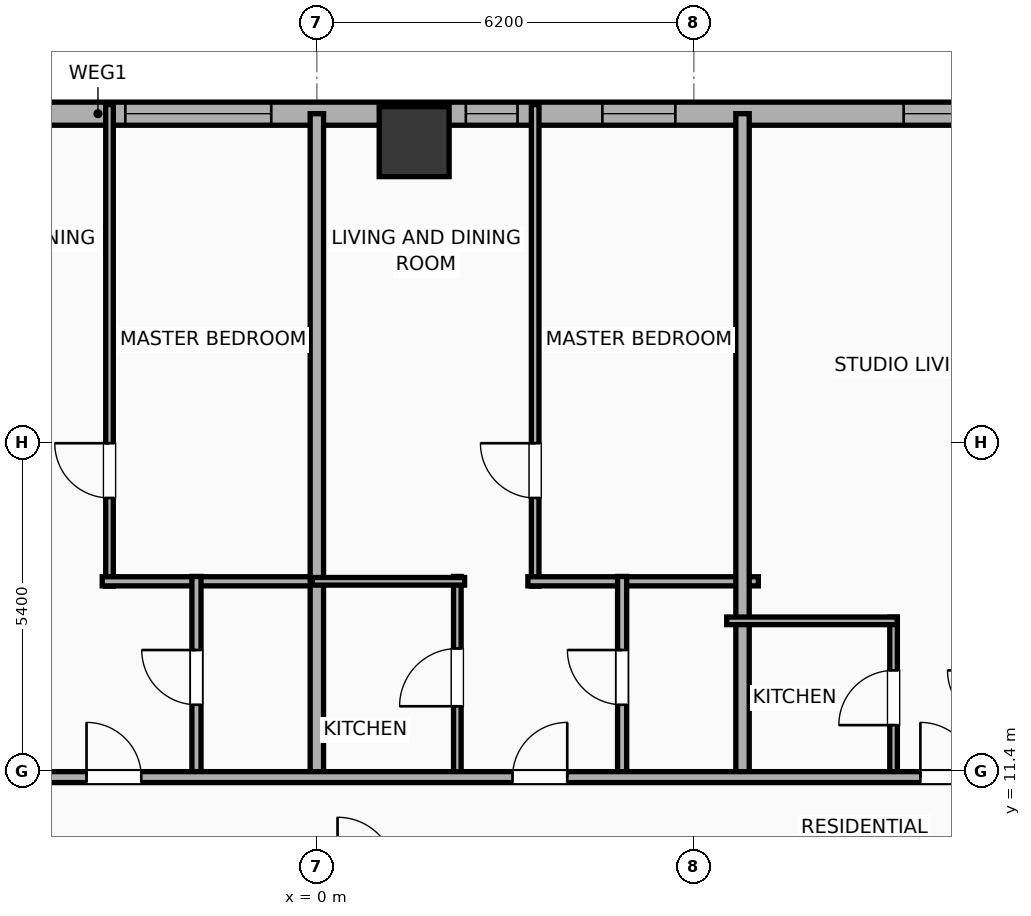
"""IFC4 building model, lengths in metres.
Left out: names, types, materials, properties, quantities, classifications, styles, units other than length and angle.
Written with IfcOpenShell. Run it as: python <this file> out.ifc"""

import sys

from ifc_helpers import new_model, si_unit, direction, frame, frame_2d, origin, origin_2d, place, context, subcontext, project, spatial, rectangle, hollow_rectangle, extrude, element, fill, save


model = new_model("IFC4")
c1 = context("Model", 3, precision=1e-05, world=origin(), true_north=direction((0.0, 1.0)))
c2 = subcontext(c1, "Body", "Model", "MODEL_VIEW")
j1 = project(units=[si_unit("LENGTHUNIT", "METRE"), si_unit("PLANEANGLEUNIT", "RADIAN")], contexts=[c1])
p1 = place(None, origin())
s1 = spatial("IfcSite", under=j1, at=p1, CompositionType="ELEMENT")
p2 = place(p1, origin())
s2 = spatial("IfcBuilding", under=s1, at=p2, CompositionType="ELEMENT")
p3 = place(p2, frame((0.0, 0.0, 49.4)))
s3 = spatial("IfcBuildingStorey", under=s2, at=p3, CompositionType="ELEMENT", Elevation=49.4)
p4 = place(p3, frame((1.6, 21.75, 0.0), z_axis=(0.0, 0.0, 1.0), x_axis=(1.0, 0.0, 0.0)))
e1 = element("IfcColumn", 1, at=p4, inside=s3, PredefinedType="COLUMN", context=c2, shape_type="SweptSolid", body=[
    extrude(hollow_rectangle(XDim=1.15, YDim=1.15, WallThickness=0.04, at=origin_2d()), origin(), (0.0, 0.0, 1.0), 3.9),
])
p5 = place(p3, frame((-29.581, 22.21, 0.0), z_axis=(0.0, 0.0, 1.0), x_axis=(1.0, 0.0, 0.0)))
e2 = element("IfcWall", 2, at=p5, inside=s3, PredefinedType="ELEMENTEDWALL", context=c2, shape_type="SweptSolid", body=[
    extrude(rectangle(XDim=51.963, YDim=0.38, at=frame_2d((25.981, 0.0))), origin(), (0.0, 0.0, 1.0), 3.65),
])
p6 = place(p5, frame((6.61, 0.0, 0.75)))
e3 = element("IfcOpeningElement", 3, at=p6, cuts=e2, PredefinedType="OPENING", context=c2, shape_type="SweptSolid", body=[
    extrude(rectangle(XDim=2.4, YDim=2.1, at=frame_2d((1.2, 1.05))), frame((0.0, 0.2, 0.0), z_axis=(0.0, -1.0, 0.0), x_axis=(1.0, 0.0, 0.0)), (0.0, 0.0, 1.0), 0.4),
])
p7 = place(p5, frame((26.431, 0.0, 0.75)))
e4 = element("IfcOpeningElement", 4, at=p7, cuts=e2, PredefinedType="OPENING", context=c2, shape_type="SweptSolid", body=[
    extrude(rectangle(XDim=2.4, YDim=2.1, at=frame_2d((1.2, 1.05))), frame((0.0, 0.2, 0.0), z_axis=(0.0, -1.0, 0.0), x_axis=(1.0, 0.0, 0.0)), (0.0, 0.0, 1.0), 0.4),
])
p8 = place(p5, frame((43.752, 0.0, 0.75)))
e5 = element("IfcOpeningElement", 5, at=p8, cuts=e2, PredefinedType="OPENING", context=c2, shape_type="SweptSolid", body=[
    extrude(rectangle(XDim=2.4, YDim=2.1, at=frame_2d((1.2, 1.05))), frame((0.0, 0.2, 0.0), z_axis=(0.0, -1.0, 0.0), x_axis=(1.0, 0.0, 0.0)), (0.0, 0.0, 1.0), 0.4),
])
p9 = place(p5, frame((1.281, 0.0, 0.75)))
e6 = element("IfcOpeningElement", 6, at=p9, cuts=e2, PredefinedType="OPENING", context=c2, shape_type="SweptSolid", body=[
    extrude(rectangle(XDim=1.2, YDim=2.05, at=frame_2d((0.6, 1.025))), frame((0.0, 0.2, 0.0), z_axis=(0.0, -1.0, 0.0), x_axis=(1.0, 0.0, 0.0)), (0.0, 0.0, 1.0), 0.4),
])
p10 = place(p5, frame((3.922, 0.0, 0.75)))
e7 = element("IfcOpeningElement", 7, at=p10, cuts=e2, PredefinedType="OPENING", context=c2, shape_type="SweptSolid", body=[
    extrude(rectangle(XDim=1.2, YDim=2.05, at=frame_2d((0.6, 1.025))), frame((0.0, 0.2, 0.0), z_axis=(0.0, -1.0, 0.0), x_axis=(1.0, 0.0, 0.0)), (0.0, 0.0, 1.0), 0.4),
])
p11 = place(p5, frame((12.231, 0.0, 0.75)))
e8 = element("IfcOpeningElement", 8, at=p11, cuts=e2, PredefinedType="OPENING", context=c2, shape_type="SweptSolid", body=[
    extrude(rectangle(XDim=1.2, YDim=2.05, at=frame_2d((0.6, 1.025))), frame((0.0, 0.2, 0.0), z_axis=(0.0, -1.0, 0.0), x_axis=(1.0, 0.0, 0.0)), (0.0, 0.0, 1.0), 0.4),
])
p12 = place(p5, frame((18.805, 0.0, 0.75)))
e9 = element("IfcOpeningElement", 9, at=p12, cuts=e2, PredefinedType="OPENING", context=c2, shape_type="SweptSolid", body=[
    extrude(rectangle(XDim=1.2, YDim=2.05, at=frame_2d((0.6, 1.025))), frame((0.0, 0.2, 0.0), z_axis=(0.0, -1.0, 0.0), x_axis=(1.0, 0.0, 0.0)), (0.0, 0.0, 1.0), 0.4),
])
p13 = place(p5, frame((16.755, 0.0, 0.75)))
e10 = element("IfcOpeningElement", 10, at=p13, cuts=e2, PredefinedType="OPENING", context=c2, shape_type="SweptSolid", body=[
    extrude(rectangle(XDim=1.2, YDim=2.05, at=frame_2d((0.6, 1.025))), frame((0.0, 0.2, 0.0), z_axis=(0.0, -1.0, 0.0), x_axis=(1.0, 0.0, 0.0)), (0.0, 0.0, 1.0), 0.4),
])
p14 = place(p5, frame((23.776, 0.0, 0.75)))
e11 = element("IfcOpeningElement", 11, at=p14, cuts=e2, PredefinedType="OPENING", context=c2, shape_type="SweptSolid", body=[
    extrude(rectangle(XDim=1.2, YDim=2.05, at=frame_2d((0.6, 1.025))), frame((0.0, 0.2, 0.0), z_axis=(0.0, -1.0, 0.0), x_axis=(1.0, 0.0, 0.0)), (0.0, 0.0, 1.0), 0.4),
])
p15 = place(p5, frame((32.031, 0.0, 0.75)))
e12 = element("IfcOpeningElement", 12, at=p15, cuts=e2, PredefinedType="OPENING", context=c2, shape_type="SweptSolid", body=[
    extrude(rectangle(XDim=0.85, YDim=2.05, at=frame_2d((0.425, 1.025))), frame((0.0, 0.2, 0.0), z_axis=(0.0, -1.0, 0.0), x_axis=(1.0, 0.0, 0.0)), (0.0, 0.0, 1.0), 0.4),
])
p16 = place(p5, frame((34.276, 0.0, 0.75)))
e13 = element("IfcOpeningElement", 13, at=p16, cuts=e2, PredefinedType="OPENING", context=c2, shape_type="SweptSolid", body=[
    extrude(rectangle(XDim=1.2, YDim=2.05, at=frame_2d((0.6, 1.025))), frame((0.0, 0.2, 0.0), z_axis=(0.0, -1.0, 0.0), x_axis=(1.0, 0.0, 0.0)), (0.0, 0.0, 1.0), 0.4),
])
p17 = place(p5, frame((39.231, 0.0, 0.75)))
e14 = element("IfcOpeningElement", 14, at=p17, cuts=e2, PredefinedType="OPENING", context=c2, shape_type="SweptSolid", body=[
    extrude(rectangle(XDim=1.2, YDim=2.05, at=frame_2d((0.6, 1.025))), frame((0.0, 0.2, 0.0), z_axis=(0.0, -1.0, 0.0), x_axis=(1.0, 0.0, 0.0)), (0.0, 0.0, 1.0), 0.4),
])
p18 = place(p5, frame((47.676, 0.0, 0.75)))
e15 = element("IfcOpeningElement", 15, at=p18, cuts=e2, PredefinedType="OPENING", context=c2, shape_type="SweptSolid", body=[
    extrude(rectangle(XDim=1.2, YDim=2.05, at=frame_2d((0.6, 1.025))), frame((0.0, 0.2, 0.0), z_axis=(0.0, -1.0, 0.0), x_axis=(1.0, 0.0, 0.0)), (0.0, 0.0, 1.0), 0.4),
])
p19 = place(p5, frame((49.847, 0.0, 0.75)))
e16 = element("IfcOpeningElement", 16, at=p19, cuts=e2, PredefinedType="OPENING", context=c2, shape_type="SweptSolid", body=[
    extrude(rectangle(XDim=1.2, YDim=2.05, at=frame_2d((0.6, 1.025))), frame((0.0, 0.2, 0.0), z_axis=(0.0, -1.0, 0.0), x_axis=(1.0, 0.0, 0.0)), (0.0, 0.0, 1.0), 0.4),
])
p20 = place(p3, frame((-3.41, 14.44, 0.0), z_axis=(0.0, 0.0, 1.0), x_axis=(0.0, 1.0, 0.0)))
e17 = element("IfcWall", 17, at=p20, inside=s3, PredefinedType="PARTITIONING", context=c2, shape_type="SweptSolid", body=[
    extrude(rectangle(XDim=7.92, YDim=0.125, at=frame_2d((3.96, 0.0))), origin(), (0.0, 0.0, 1.0), 3.65),
])
p21 = place(p20, frame((1.451, 0.0, 0.0)))
e18 = element("IfcOpeningElement", 18, at=p21, cuts=e17, PredefinedType="OPENING", context=c2, shape_type="SweptSolid", body=[
    extrude(rectangle(XDim=0.9, YDim=2.05, at=frame_2d((0.45, 1.025))), frame((0.0, 0.073, 0.0), z_axis=(0.0, -1.0, 0.0), x_axis=(1.0, 0.0, 0.0)), (0.0, 0.0, 1.0), 0.145),
])
p22 = place(p3, frame((-3.53, 14.52, 0.0), z_axis=(0.0, 0.0, 1.0), x_axis=(1.0, 0.0, 0.0)))
e19 = element("IfcWall", 19, at=p22, inside=s3, PredefinedType="PLUMBINGWALL", context=c2, shape_type="SweptSolid", body=[
    extrude(rectangle(XDim=3.605, YDim=0.15, at=frame_2d((1.802, 0.0))), origin(), (0.0, 0.0, 1.0), 3.65),
])
p23 = place(p3, frame((-1.98, 11.28, 0.0), z_axis=(0.0, 0.0, 1.0), x_axis=(0.0, 1.0, 0.0)))
e20 = element("IfcWall", 20, at=p23, inside=s3, PredefinedType="PLUMBINGWALL", context=c2, shape_type="SweptSolid", body=[
    extrude(rectangle(XDim=3.32, YDim=0.15, at=frame_2d((1.66, 0.0))), origin(), (0.0, 0.0, 1.0), 3.65),
])
p24 = place(p23, frame((1.21, 0.0, 0.0)))
e21 = element("IfcOpeningElement", 21, at=p24, cuts=e20, PredefinedType="OPENING", context=c2, shape_type="SweptSolid", body=[
    extrude(rectangle(XDim=0.9, YDim=2.05, at=frame_2d((0.45, 1.025))), frame((0.0, 0.085, 0.0), z_axis=(0.0, -1.0, 0.0), x_axis=(1.0, 0.0, 0.0)), (0.0, 0.0, 1.0), 0.17),
])
p25 = place(p3, frame((0.0, 11.22, 0.0), z_axis=(0.0, 0.0, 1.0), x_axis=(0.0, 1.0, 0.0)))
e22 = element("IfcWall", 22, at=p25, inside=s3, PredefinedType="PARTITIONING", context=c2, shape_type="SweptSolid", body=[
    extrude(rectangle(XDim=10.99, YDim=0.22, at=frame_2d((5.495, 0.0))), origin(), (0.0, 0.0, 1.0), 3.65),
])
p26 = place(p3, frame((3.59, 14.44, 0.0), z_axis=(0.0, 0.0, 1.0), x_axis=(0.0, 1.0, 0.0)))
e23 = element("IfcWall", 23, at=p26, inside=s3, PredefinedType="PARTITIONING", context=c2, shape_type="SweptSolid", body=[
    extrude(rectangle(XDim=7.92, YDim=0.125, at=frame_2d((3.96, 0.0))), origin(), (0.0, 0.0, 1.0), 3.65),
])
p27 = place(p26, frame((1.451, 0.0, 0.0)))
e24 = element("IfcOpeningElement", 24, at=p27, cuts=e23, PredefinedType="OPENING", context=c2, shape_type="SweptSolid", body=[
    extrude(rectangle(XDim=0.9, YDim=2.05, at=frame_2d((0.45, 1.025))), frame((0.0, 0.073, 0.0), z_axis=(0.0, -1.0, 0.0), x_axis=(1.0, 0.0, 0.0)), (0.0, 0.0, 1.0), 0.145),
])
p28 = place(p3, frame((3.47, 14.52, 0.0), z_axis=(0.0, 0.0, 1.0), x_axis=(1.0, 0.0, 0.0)))
e25 = element("IfcWall", 25, at=p28, inside=s3, PredefinedType="PLUMBINGWALL", context=c2, shape_type="SweptSolid", body=[
    extrude(rectangle(XDim=3.79, YDim=0.15, at=frame_2d((1.895, 0.0))), origin(), (0.0, 0.0, 1.0), 3.65),
])
p29 = place(p3, frame((2.31, 11.28, 0.0), z_axis=(0.0, 0.0, 1.0), x_axis=(0.0, 1.0, 0.0)))
e26 = element("IfcWall", 26, at=p29, inside=s3, PredefinedType="PARTITIONING", context=c2, shape_type="SweptSolid", body=[
    extrude(rectangle(XDim=3.32, YDim=0.125, at=frame_2d((1.66, 0.0))), origin(), (0.0, 0.0, 1.0), 3.65),
])
p30 = place(p29, frame((1.185, 0.0, 0.0)))
e27 = element("IfcOpeningElement", 27, at=p30, cuts=e26, PredefinedType="OPENING", context=c2, shape_type="SweptSolid", body=[
    extrude(rectangle(XDim=0.95, YDim=2.05, at=frame_2d((0.475, 1.025))), frame((0.0, 0.073, 0.0), z_axis=(0.0, -1.0, 0.0), x_axis=(1.0, 0.0, 0.0)), (0.0, 0.0, 1.0), 0.145),
])
p31 = place(p3, frame((-0.075, 14.52, 0.0), z_axis=(0.0, 0.0, 1.0), x_axis=(1.0, 0.0, 0.0)))
e28 = element("IfcWall", 28, at=p31, inside=s3, PredefinedType="PARTITIONING", context=c2, shape_type="SweptSolid", body=[
    extrude(rectangle(XDim=2.505, YDim=0.125, at=frame_2d((1.252, 0.0))), origin(), (0.0, 0.0, 1.0), 3.65),
])
p32 = place(p3, frame((5.02, 11.28, 0.0), z_axis=(0.0, 0.0, 1.0), x_axis=(0.0, 1.0, 0.0)))
e29 = element("IfcWall", 29, at=p32, inside=s3, PredefinedType="PLUMBINGWALL", context=c2, shape_type="SweptSolid", body=[
    extrude(rectangle(XDim=3.32, YDim=0.15, at=frame_2d((1.66, 0.0))), origin(), (0.0, 0.0, 1.0), 3.65),
])
p33 = place(p32, frame((1.21, 0.0, 0.0)))
e30 = element("IfcOpeningElement", 30, at=p33, cuts=e29, PredefinedType="OPENING", context=c2, shape_type="SweptSolid", body=[
    extrude(rectangle(XDim=0.9, YDim=2.05, at=frame_2d((0.45, 1.025))), frame((0.0, 0.085, 0.0), z_axis=(0.0, -1.0, 0.0), x_axis=(1.0, 0.0, 0.0)), (0.0, 0.0, 1.0), 0.17),
])
p34 = place(p3, frame((7.0, 11.22, 0.0), z_axis=(0.0, 0.0, 1.0), x_axis=(0.0, 1.0, 0.0)))
e31 = element("IfcWall", 31, at=p34, inside=s3, PredefinedType="PARTITIONING", context=c2, shape_type="SweptSolid", body=[
    extrude(rectangle(XDim=10.99, YDim=0.22, at=frame_2d((5.495, 0.0))), origin(), (0.0, 0.0, 1.0), 3.65),
])
p35 = place(p3, frame((9.484, 11.28, 0.0), z_axis=(0.0, 0.0, 1.0), x_axis=(0.0, 1.0, 0.0)))
e32 = element("IfcWall", 32, at=p35, inside=s3, PredefinedType="PARTITIONING", context=c2, shape_type="SweptSolid", body=[
    extrude(rectangle(XDim=2.65, YDim=0.125, at=frame_2d((1.325, 0.0))), origin(), (0.0, 0.0, 1.0), 3.65),
])
p36 = place(p35, frame((0.875, 0.0, 0.0)))
e33 = element("IfcOpeningElement", 33, at=p36, cuts=e32, PredefinedType="OPENING", context=c2, shape_type="SweptSolid", body=[
    extrude(rectangle(XDim=0.9, YDim=2.05, at=frame_2d((0.45, 1.025))), frame((0.0, 0.073, 0.0), z_axis=(0.0, -1.0, 0.0), x_axis=(1.0, 0.0, 0.0)), (0.0, 0.0, 1.0), 0.145),
])
p37 = place(p3, frame((6.74, 13.87, 0.0), z_axis=(0.0, 0.0, 1.0), x_axis=(1.0, 0.0, 0.0)))
e34 = element("IfcWall", 34, at=p37, inside=s3, PredefinedType="PARTITIONING", context=c2, shape_type="SweptSolid", body=[
    extrude(rectangle(XDim=2.804, YDim=0.125, at=frame_2d((1.402, 0.0))), origin(), (0.0, 0.0, 1.0), 3.65),
])
p38 = place(p3, frame((-33.41, 11.3, 0.0), z_axis=(0.0, 0.0, 1.0), x_axis=(1.0, 0.0, 0.0)))
e35 = element("IfcWall", 35, at=p38, inside=s3, PredefinedType="PARTITIONING", context=c2, shape_type="SweptSolid", body=[
    extrude(rectangle(XDim=59.62, YDim=0.18, at=frame_2d((29.81, 0.0))), origin(), (0.0, 0.0, 1.0), 3.65),
])
p39 = place(p38, frame((3.032, 0.0, 0.0)))
e36 = element("IfcOpeningElement", 36, at=p39, cuts=e35, PredefinedType="OPENING", context=c2, shape_type="SweptSolid", body=[
    extrude(rectangle(XDim=0.9, YDim=2.05, at=frame_2d((0.45, 1.025))), frame((0.0, 0.1, 0.0), z_axis=(0.0, -1.0, 0.0), x_axis=(1.0, 0.0, 0.0)), (0.0, 0.0, 1.0), 0.2),
])
p40 = place(p38, frame((9.769, 0.0, 0.0)))
e37 = element("IfcOpeningElement", 37, at=p40, cuts=e35, PredefinedType="OPENING", context=c2, shape_type="SweptSolid", body=[
    extrude(rectangle(XDim=0.9, YDim=2.05, at=frame_2d((0.45, 1.025))), frame((0.0, 0.1, 0.0), z_axis=(0.0, -1.0, 0.0), x_axis=(1.0, 0.0, 0.0)), (0.0, 0.0, 1.0), 0.2),
])
p41 = place(p38, frame((16.339, 0.0, 0.0)))
e38 = element("IfcOpeningElement", 38, at=p41, cuts=e35, PredefinedType="OPENING", context=c2, shape_type="SweptSolid", body=[
    extrude(rectangle(XDim=0.9, YDim=2.05, at=frame_2d((0.45, 1.025))), frame((0.0, 0.1, 0.0), z_axis=(0.0, -1.0, 0.0), x_axis=(1.0, 0.0, 0.0)), (0.0, 0.0, 1.0), 0.2),
])
p42 = place(p38, frame((23.827, 0.0, 0.0)))
e39 = element("IfcOpeningElement", 39, at=p42, cuts=e35, PredefinedType="OPENING", context=c2, shape_type="SweptSolid", body=[
    extrude(rectangle(XDim=1.15, YDim=2.05, at=frame_2d((0.575, 1.025))), frame((0.0, 0.1, 0.0), z_axis=(0.0, -1.0, 0.0), x_axis=(1.0, 0.0, 0.0)), (0.0, 0.0, 1.0), 0.2),
])
p43 = place(p38, frame((29.622, 0.0, 0.0)))
e40 = element("IfcOpeningElement", 40, at=p43, cuts=e35, PredefinedType="OPENING", context=c2, shape_type="SweptSolid", body=[
    extrude(rectangle(XDim=0.9, YDim=2.05, at=frame_2d((0.45, 1.025))), frame((0.0, 0.1, 0.0), z_axis=(0.0, -1.0, 0.0), x_axis=(1.0, 0.0, 0.0)), (0.0, 0.0, 1.0), 0.2),
])
p44 = place(p38, frame((36.628, 0.0, 0.0)))
e41 = element("IfcOpeningElement", 41, at=p44, cuts=e35, PredefinedType="OPENING", context=c2, shape_type="SweptSolid", body=[
    extrude(rectangle(XDim=0.9, YDim=2.05, at=frame_2d((0.45, 1.025))), frame((0.0, 0.1, 0.0), z_axis=(0.0, -1.0, 0.0), x_axis=(1.0, 0.0, 0.0)), (0.0, 0.0, 1.0), 0.2),
])
p45 = place(p38, frame((43.335, 0.0, 0.0)))
e42 = element("IfcOpeningElement", 42, at=p45, cuts=e35, PredefinedType="OPENING", context=c2, shape_type="SweptSolid", body=[
    extrude(rectangle(XDim=0.9, YDim=2.05, at=frame_2d((0.45, 1.025))), frame((0.0, 0.1, 0.0), z_axis=(0.0, -1.0, 0.0), x_axis=(1.0, 0.0, 0.0)), (0.0, 0.0, 1.0), 0.2),
])
p46 = place(p38, frame((48.307, 0.0, 0.0)))
e43 = element("IfcOpeningElement", 43, at=p46, cuts=e35, PredefinedType="OPENING", context=c2, shape_type="SweptSolid", body=[
    extrude(rectangle(XDim=1.15, YDim=2.05, at=frame_2d((0.575, 1.025))), frame((0.0, 0.1, 0.0), z_axis=(0.0, -1.0, 0.0), x_axis=(1.0, 0.0, 0.0)), (0.0, 0.0, 1.0), 0.2),
])
p47 = place(p38, frame((56.225, 0.0, 0.0)))
e44 = element("IfcOpeningElement", 44, at=p47, cuts=e35, PredefinedType="OPENING", context=c2, shape_type="SweptSolid", body=[
    extrude(rectangle(XDim=0.9, YDim=2.05, at=frame_2d((0.45, 1.025))), frame((0.0, 0.1, 0.0), z_axis=(0.0, -1.0, 0.0), x_axis=(1.0, 0.0, 0.0)), (0.0, 0.0, 1.0), 0.2),
])
p48 = place(p7, origin())
e45 = element("IfcWindow", 45, at=p48, inside=s3, PartitioningType="SINGLE_PANEL", PredefinedType="WINDOW", context=c2, shape_type="SweptSolid", body=[
    extrude(rectangle(XDim=2.4, YDim=2.1, at=frame_2d((1.2, 1.05))), frame((0.0, 0.03, 0.0), z_axis=(0.0, -1.0, 0.0), x_axis=(1.0, 0.0, 0.0)), (0.0, 0.0, 1.0), 0.06),
])
fill(e4, e45)
p49 = place(p15, origin())
e46 = element("IfcWindow", 46, at=p49, inside=s3, PartitioningType="SINGLE_PANEL", PredefinedType="WINDOW", context=c2, shape_type="SweptSolid", body=[
    extrude(rectangle(XDim=0.85, YDim=2.05, at=frame_2d((0.425, 1.025))), frame((0.0, 0.03, 0.0), z_axis=(0.0, -1.0, 0.0), x_axis=(1.0, 0.0, 0.0)), (0.0, 0.0, 1.0), 0.06),
])
fill(e12, e46)
p50 = place(p16, origin())
e47 = element("IfcWindow", 47, at=p50, inside=s3, PartitioningType="SINGLE_PANEL", PredefinedType="WINDOW", context=c2, shape_type="SweptSolid", body=[
    extrude(rectangle(XDim=1.2, YDim=2.05, at=frame_2d((0.6, 1.025))), frame((0.0, 0.03, 0.0), z_axis=(0.0, -1.0, 0.0), x_axis=(1.0, 0.0, 0.0)), (0.0, 0.0, 1.0), 0.06),
])
fill(e13, e47)
p51 = place(p17, origin())
e48 = element("IfcWindow", 48, at=p51, inside=s3, PartitioningType="SINGLE_PANEL", PredefinedType="WINDOW", context=c2, shape_type="SweptSolid", body=[
    extrude(rectangle(XDim=1.2, YDim=2.05, at=frame_2d((0.6, 1.025))), frame((0.0, 0.03, 0.0), z_axis=(0.0, -1.0, 0.0), x_axis=(1.0, 0.0, 0.0)), (0.0, 0.0, 1.0), 0.06),
])
fill(e14, e48)
p52 = place(p21, origin())
e49 = element("IfcDoor", 49, at=p52, inside=s3, OperationType="SINGLE_SWING_RIGHT", PredefinedType="DOOR", context=c2, shape_type="SweptSolid", body=[
    extrude(rectangle(XDim=0.9, YDim=2.05, at=frame_2d((0.45, 1.025))), frame((0.0, 0.025, 0.0), z_axis=(0.0, -1.0, 0.0), x_axis=(1.0, 0.0, 0.0)), (0.0, 0.0, 1.0), 0.05),
])
fill(e18, e49)
p53 = place(p24, origin())
e50 = element("IfcDoor", 50, at=p53, inside=s3, OperationType="SINGLE_SWING_RIGHT", PredefinedType="DOOR", context=c2, shape_type="SweptSolid", body=[
    extrude(rectangle(XDim=0.9, YDim=2.05, at=frame_2d((0.45, 1.025))), frame((0.0, 0.025, 0.0), z_axis=(0.0, -1.0, 0.0), x_axis=(1.0, 0.0, 0.0)), (0.0, 0.0, 1.0), 0.05),
])
fill(e21, e50)
p54 = place(p27, origin())
e51 = element("IfcDoor", 51, at=p54, inside=s3, OperationType="SINGLE_SWING_RIGHT", PredefinedType="DOOR", context=c2, shape_type="SweptSolid", body=[
    extrude(rectangle(XDim=0.9, YDim=2.05, at=frame_2d((0.45, 1.025))), frame((0.0, 0.025, 0.0), z_axis=(0.0, -1.0, 0.0), x_axis=(1.0, 0.0, 0.0)), (0.0, 0.0, 1.0), 0.05),
])
fill(e24, e51)
p55 = place(p30, origin())
e52 = element("IfcDoor", 52, at=p55, inside=s3, OperationType="SINGLE_SWING_LEFT", PredefinedType="DOOR", context=c2, shape_type="SweptSolid", body=[
    extrude(rectangle(XDim=0.95, YDim=2.05, at=frame_2d((0.475, 1.025))), frame((0.0, 0.025, 0.0), z_axis=(0.0, -1.0, 0.0), x_axis=(1.0, 0.0, 0.0)), (0.0, 0.0, 1.0), 0.05),
])
fill(e27, e52)
p56 = place(p33, origin())
e53 = element("IfcDoor", 53, at=p56, inside=s3, OperationType="SINGLE_SWING_RIGHT", PredefinedType="DOOR", context=c2, shape_type="SweptSolid", body=[
    extrude(rectangle(XDim=0.9, YDim=2.05, at=frame_2d((0.45, 1.025))), frame((0.0, 0.025, 0.0), z_axis=(0.0, -1.0, 0.0), x_axis=(1.0, 0.0, 0.0)), (0.0, 0.0, 1.0), 0.05),
])
fill(e30, e53)
p57 = place(p36, origin())
e54 = element("IfcDoor", 54, at=p57, inside=s3, OperationType="SINGLE_SWING_LEFT", PredefinedType="DOOR", context=c2, shape_type="SweptSolid", body=[
    extrude(rectangle(XDim=0.9, YDim=2.05, at=frame_2d((0.45, 1.025))), frame((0.0, 0.025, 0.0), z_axis=(0.0, -1.0, 0.0), x_axis=(1.0, 0.0, 0.0)), (0.0, 0.0, 1.0), 0.05),
])
fill(e33, e54)
p58 = place(p43, origin())
e55 = element("IfcDoor", 55, at=p58, inside=s3, OperationType="SINGLE_SWING_LEFT", PredefinedType="DOOR", context=c2, shape_type="SweptSolid", body=[
    extrude(rectangle(XDim=0.9, YDim=2.05, at=frame_2d((0.45, 1.025))), frame((0.0, 0.025, 0.0), z_axis=(0.0, -1.0, 0.0), x_axis=(1.0, 0.0, 0.0)), (0.0, 0.0, 1.0), 0.05),
])
fill(e40, e55)
p59 = place(p44, origin())
e56 = element("IfcDoor", 56, at=p59, inside=s3, OperationType="SINGLE_SWING_RIGHT", PredefinedType="DOOR", context=c2, shape_type="SweptSolid", body=[
    extrude(rectangle(XDim=0.9, YDim=2.05, at=frame_2d((0.45, 1.025))), frame((0.0, 0.025, 0.0), z_axis=(0.0, -1.0, 0.0), x_axis=(1.0, 0.0, 0.0)), (0.0, 0.0, 1.0), 0.05),
])
fill(e41, e56)
p60 = place(p45, origin())
e57 = element("IfcDoor", 57, at=p60, inside=s3, OperationType="SINGLE_SWING_LEFT", PredefinedType="DOOR", context=c2, shape_type="SweptSolid", body=[
    extrude(rectangle(XDim=0.9, YDim=2.05, at=frame_2d((0.45, 1.025))), frame((0.0, 0.025, 0.0), z_axis=(0.0, -1.0, 0.0), x_axis=(1.0, 0.0, 0.0)), (0.0, 0.0, 1.0), 0.05),
])
fill(e42, e57)
save(model, sys.argv[1])
